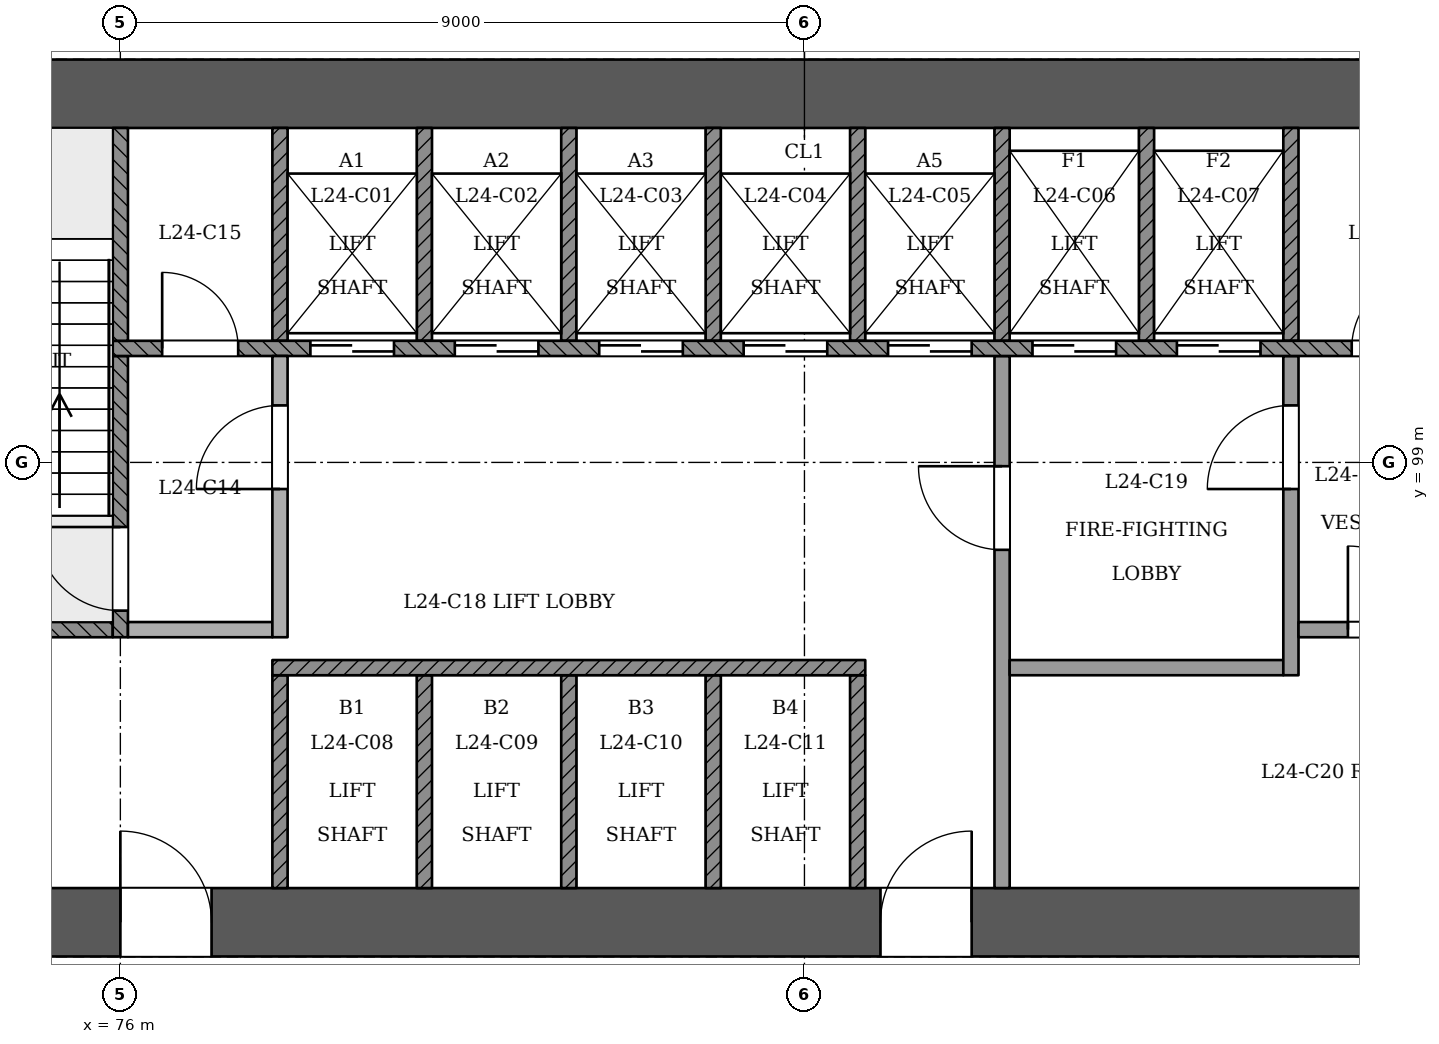
"""IFC4 building model, lengths in metres.
Left out: names, types, materials, properties, quantities, classifications, styles, units other than length and angle.
Written with IfcOpenShell. Run it as: python <this file> out.ifc"""

import sys

from ifc_helpers import new_model, si_unit, direction, frame, frame_2d, origin, place, context, subcontext, project, spatial, rectangle, extrude, element, fill, save


model = new_model("IFC4")
c1 = context("Model", 3, precision=1e-05, world=origin(), true_north=direction((0.0, 1.0)))
c2 = subcontext(c1, "Body", "Model", "MODEL_VIEW")
j1 = project(units=[si_unit("LENGTHUNIT", "METRE"), si_unit("PLANEANGLEUNIT", "RADIAN")], contexts=[c1])
p1 = place(None, origin())
s1 = spatial("IfcSite", under=j1, at=p1, CompositionType="ELEMENT")
p2 = place(p1, origin())
s2 = spatial("IfcBuilding", under=s1, at=p2, CompositionType="ELEMENT")
p3 = place(p2, frame((0.0, 0.0, 95.4)))
s3 = spatial("IfcBuildingStorey", under=s2, at=p3, CompositionType="ELEMENT", Elevation=95.4)
p4 = place(p3, frame((72.55, 92.95, 0.0), z_axis=(0.0, 0.0, 1.0), x_axis=(1.0, 0.0, 0.0)))
e1 = element("IfcWall", 1, at=p4, inside=s3, PredefinedType="SHEAR", context=c2, shape_type="SweptSolid", body=[
    extrude(rectangle(XDim=25.35, YDim=0.9, at=frame_2d((12.675, 0.0))), origin(), (0.0, 0.0, 1.0), 5.4),
])
p5 = place(p4, frame((1.25, 0.0, 0.0)))
e2 = element("IfcOpeningElement", 2, at=p5, cuts=e1, PredefinedType="OPENING", context=c2, shape_type="SweptSolid", body=[
    extrude(rectangle(XDim=1.2, YDim=2.1, at=frame_2d((0.6, 1.05))), frame((0.0, 0.46, 0.0), z_axis=(0.0, -1.0, 0.0), x_axis=(1.0, 0.0, 0.0)), (0.0, 0.0, 1.0), 0.921),
])
p6 = place(p4, frame((3.45, 0.0, 0.0)))
e3 = element("IfcOpeningElement", 3, at=p6, cuts=e1, PredefinedType="OPENING", context=c2, shape_type="SweptSolid", body=[
    extrude(rectangle(XDim=1.2, YDim=2.1, at=frame_2d((0.6, 1.05))), frame((0.0, 0.46, 0.0), z_axis=(0.0, -1.0, 0.0), x_axis=(1.0, 0.0, 0.0)), (0.0, 0.0, 1.0), 0.921),
])
p7 = place(p4, frame((13.45, 0.0, 0.0)))
e4 = element("IfcOpeningElement", 4, at=p7, cuts=e1, PredefinedType="OPENING", context=c2, shape_type="SweptSolid", body=[
    extrude(rectangle(XDim=1.2, YDim=2.1, at=frame_2d((0.6, 1.05))), frame((0.0, 0.46, 0.0), z_axis=(0.0, -1.0, 0.0), x_axis=(1.0, 0.0, 0.0)), (0.0, 0.0, 1.0), 0.921),
])
p8 = place(p4, frame((21.75, 0.0, 0.0)))
e5 = element("IfcOpeningElement", 5, at=p8, cuts=e1, PredefinedType="OPENING", context=c2, shape_type="SweptSolid", body=[
    extrude(rectangle(XDim=1.2, YDim=2.1, at=frame_2d((0.6, 1.05))), frame((0.0, 0.46, 0.0), z_axis=(0.0, -1.0, 0.0), x_axis=(1.0, 0.0, 0.0)), (0.0, 0.0, 1.0), 0.921),
])
p9 = place(p3, frame((97.45, 103.85, 0.0), z_axis=(0.0, 0.0, 1.0), x_axis=(-1.0, 0.0, 0.0)))
e6 = element("IfcWall", 6, at=p9, inside=s3, PredefinedType="SHEAR", context=c2, shape_type="SweptSolid", body=[
    extrude(rectangle(XDim=25.35, YDim=0.9, at=frame_2d((12.675, 0.0))), origin(), (0.0, 0.0, 1.0), 5.4),
])
p10 = place(p3, frame((85.516, 61.158, 0.0), z_axis=(0.0, 0.0, 1.0), x_axis=(0.499997295205, 0.866026965393, 0.0)))
e7 = element("IfcWall", 7, at=p10, inside=s3, PredefinedType="PARTITIONING", context=c2, shape_type="SweptSolid", body=[
    extrude(rectangle(XDim=42.086, YDim=0.2, at=frame_2d((21.043, 0.0))), origin(), (0.0, 0.0, 1.0), 4.5),
])
p11 = place(p10, frame((0.2, 0.0, 0.0)))
e8 = element("IfcOpeningElement", 8, at=p11, cuts=e7, PredefinedType="OPENING", context=c2, shape_type="SweptSolid", body=[
    extrude(rectangle(XDim=1.2, YDim=2.4, at=frame_2d((0.6, 1.2))), frame((0.0, 0.11, 0.0), z_axis=(0.0, -1.0, 0.0), x_axis=(1.0, 0.0, 0.0)), (0.0, 0.0, 1.0), 0.221),
])
p12 = place(p10, frame((9.193, 0.0, 0.0)))
e9 = element("IfcOpeningElement", 9, at=p12, cuts=e7, PredefinedType="OPENING", context=c2, shape_type="SweptSolid", body=[
    extrude(rectangle(XDim=1.2, YDim=2.4, at=frame_2d((0.6, 1.2))), frame((0.0, 0.11, 0.0), z_axis=(0.0, -1.0, 0.0), x_axis=(1.0, 0.0, 0.0)), (0.0, 0.0, 1.0), 0.221),
])
p13 = place(p10, frame((20.443, 0.0, 0.0)))
e10 = element("IfcOpeningElement", 10, at=p13, cuts=e7, PredefinedType="OPENING", context=c2, shape_type="SweptSolid", body=[
    extrude(rectangle(XDim=1.2, YDim=2.4, at=frame_2d((0.6, 1.2))), frame((0.0, 0.11, 0.0), z_axis=(0.0, -1.0, 0.0), x_axis=(1.0, 0.0, 0.0)), (0.0, 0.0, 1.0), 0.221),
])
p14 = place(p10, frame((29.443, 0.0, 0.0)))
e11 = element("IfcOpeningElement", 11, at=p14, cuts=e7, PredefinedType="OPENING", context=c2, shape_type="SweptSolid", body=[
    extrude(rectangle(XDim=1.2, YDim=2.4, at=frame_2d((0.6, 1.2))), frame((0.0, 0.11, 0.0), z_axis=(0.0, -1.0, 0.0), x_axis=(1.0, 0.0, 0.0)), (0.0, 0.0, 1.0), 0.221),
])
p15 = place(p10, frame((40.184, 0.0, 0.0)))
e12 = element("IfcOpeningElement", 12, at=p15, cuts=e7, PredefinedType="OPENING", context=c2, shape_type="SweptSolid", body=[
    extrude(rectangle(XDim=1.2, YDim=2.4, at=frame_2d((0.6, 1.2))), frame((0.0, 0.11, 0.0), z_axis=(0.0, -1.0, 0.0), x_axis=(1.0, 0.0, 0.0)), (0.0, 0.0, 1.0), 0.221),
])
for number, where, z_axis, x_axis in (
    (13, (78.1, 93.4, 0.0), (0.0, 0.0, 1.0), (0.0, 1.0, 0.0)),
    (14, (80.0, 93.4, 0.0), (0.0, 0.0, 1.0), (0.0, 1.0, 0.0)),
    (15, (81.9, 93.4, 0.0), (0.0, 0.0, 1.0), (0.0, 1.0, 0.0)),
    (16, (83.8, 93.4, 0.0), (0.0, 0.0, 1.0), (0.0, 1.0, 0.0)),
    (17, (85.7, 93.4, 0.0), (0.0, 0.0, 1.0), (0.0, 1.0, 0.0)),
):
    element("IfcWall", number, at=place(p3, frame(where, z_axis=z_axis, x_axis=x_axis)), inside=s3, PredefinedType="SOLIDWALL", context=c2, shape_type="SweptSolid", body=[
        extrude(rectangle(XDim=2.8, YDim=0.2, at=frame_2d((1.4, 0.0))), origin(), (0.0, 0.0, 1.0), 4.9),
    ])
p16 = place(p3, frame((87.6, 93.4, 0.0), z_axis=(0.0, 0.0, 1.0), x_axis=(0.0, 1.0, 0.0)))
e18 = element("IfcWall", 18, at=p16, inside=s3, PredefinedType="PARTITIONING", context=c2, shape_type="SweptSolid", body=[
    extrude(rectangle(XDim=7.0, YDim=0.2, at=frame_2d((3.5, 0.0))), origin(), (0.0, 0.0, 1.0), 4.9),
])
p17 = place(p16, frame((4.45, 0.0, 0.0)))
e19 = element("IfcOpeningElement", 19, at=p17, cuts=e18, PredefinedType="OPENING", context=c2, shape_type="SweptSolid", body=[
    extrude(rectangle(XDim=1.1, YDim=2.1, at=frame_2d((0.55, 1.05))), frame((0.0, 0.11, 0.0), z_axis=(0.0, -1.0, 0.0), x_axis=(1.0, 0.0, 0.0)), (0.0, 0.0, 1.0), 0.221),
])
p18 = place(p3, frame((78.0, 96.3, 0.0), z_axis=(0.0, 0.0, 1.0), x_axis=(1.0, 0.0, 0.0)))
e20 = element("IfcWall", 20, at=p18, inside=s3, PredefinedType="SOLIDWALL", context=c2, shape_type="SweptSolid", body=[
    extrude(rectangle(XDim=7.8, YDim=0.2, at=frame_2d((3.9, 0.0))), origin(), (0.0, 0.0, 1.0), 4.9),
])
p19 = place(p3, frame((87.7, 96.3, 0.0), z_axis=(0.0, 0.0, 1.0), x_axis=(1.0, 0.0, 0.0)))
e21 = element("IfcWall", 21, at=p19, inside=s3, PredefinedType="PARTITIONING", context=c2, shape_type="SweptSolid", body=[
    extrude(rectangle(XDim=3.6, YDim=0.2, at=frame_2d((1.8, 0.0))), origin(), (0.0, 0.0, 1.0), 4.9),
])
p20 = place(p3, frame((91.4, 96.2, 0.0), z_axis=(0.0, 0.0, 1.0), x_axis=(0.0, 1.0, 0.0)))
e22 = element("IfcWall", 22, at=p20, inside=s3, PredefinedType="PARTITIONING", context=c2, shape_type="SweptSolid", body=[
    extrude(rectangle(XDim=4.2, YDim=0.2, at=frame_2d((2.1, 0.0))), origin(), (0.0, 0.0, 1.0), 4.9),
])
p21 = place(p20, frame((2.45, 0.0, 0.0)))
e23 = element("IfcOpeningElement", 23, at=p21, cuts=e22, PredefinedType="OPENING", context=c2, shape_type="SweptSolid", body=[
    extrude(rectangle(XDim=1.1, YDim=2.1, at=frame_2d((0.55, 1.05))), frame((0.0, 0.11, 0.0), z_axis=(0.0, -1.0, 0.0), x_axis=(1.0, 0.0, 0.0)), (0.0, 0.0, 1.0), 0.221),
])
p22 = place(p3, frame((73.0, 96.8, 0.0), z_axis=(0.0, 0.0, 1.0), x_axis=(1.0, 0.0, 0.0)))
e24 = element("IfcWall", 24, at=p22, inside=s3, PredefinedType="SOLIDWALL", context=c2, shape_type="SweptSolid", body=[
    extrude(rectangle(XDim=2.9, YDim=0.2, at=frame_2d((1.45, 0.0))), origin(), (0.0, 0.0, 1.0), 4.9),
])
p23 = place(p3, frame((76.0, 96.7, 0.0), z_axis=(0.0, 0.0, 1.0), x_axis=(0.0, 1.0, 0.0)))
e25 = element("IfcWall", 25, at=p23, inside=s3, PredefinedType="SOLIDWALL", context=c2, shape_type="SweptSolid", body=[
    extrude(rectangle(XDim=3.7, YDim=0.2, at=frame_2d((1.85, 0.0))), origin(), (0.0, 0.0, 1.0), 4.9),
])
p24 = place(p23, frame((0.35, 0.0, 0.0)))
e26 = element("IfcOpeningElement", 26, at=p24, cuts=e25, PredefinedType="OPENING", context=c2, shape_type="SweptSolid", body=[
    extrude(rectangle(XDim=1.1, YDim=2.1, at=frame_2d((0.55, 1.05))), frame((0.0, 0.11, 0.0), z_axis=(0.0, -1.0, 0.0), x_axis=(1.0, 0.0, 0.0)), (0.0, 0.0, 1.0), 0.221),
])
p25 = place(p3, frame((76.1, 96.8, 0.0), z_axis=(0.0, 0.0, 1.0), x_axis=(1.0, 0.0, 0.0)))
e27 = element("IfcWall", 27, at=p25, inside=s3, PredefinedType="PARTITIONING", context=c2, shape_type="SweptSolid", body=[
    extrude(rectangle(XDim=1.9, YDim=0.2, at=frame_2d((0.95, 0.0))), origin(), (0.0, 0.0, 1.0), 4.9),
])
p26 = place(p3, frame((78.1, 96.7, 0.0), z_axis=(0.0, 0.0, 1.0), x_axis=(0.0, 1.0, 0.0)))
e28 = element("IfcWall", 28, at=p26, inside=s3, PredefinedType="PARTITIONING", context=c2, shape_type="SweptSolid", body=[
    extrude(rectangle(XDim=3.7, YDim=0.2, at=frame_2d((1.85, 0.0))), origin(), (0.0, 0.0, 1.0), 4.9),
])
p27 = place(p26, frame((1.95, 0.0, 0.0)))
e29 = element("IfcOpeningElement", 29, at=p27, cuts=e28, PredefinedType="OPENING", context=c2, shape_type="SweptSolid", body=[
    extrude(rectangle(XDim=1.1, YDim=2.1, at=frame_2d((0.55, 1.05))), frame((0.0, 0.11, 0.0), z_axis=(0.0, -1.0, 0.0), x_axis=(1.0, 0.0, 0.0)), (0.0, 0.0, 1.0), 0.221),
])
p28 = place(p3, frame((91.5, 96.8, 0.0), z_axis=(0.0, 0.0, 1.0), x_axis=(1.0, 0.0, 0.0)))
e30 = element("IfcWall", 30, at=p28, inside=s3, PredefinedType="PARTITIONING", context=c2, shape_type="SweptSolid", body=[
    extrude(rectangle(XDim=2.4, YDim=0.2, at=frame_2d((1.2, 0.0))), origin(), (0.0, 0.0, 1.0), 4.9),
])
p29 = place(p28, frame((0.65, 0.0, 0.0)))
e31 = element("IfcOpeningElement", 31, at=p29, cuts=e30, PredefinedType="OPENING", context=c2, shape_type="SweptSolid", body=[
    extrude(rectangle(XDim=1.1, YDim=2.1, at=frame_2d((0.55, 1.05))), frame((0.0, 0.11, 0.0), z_axis=(0.0, -1.0, 0.0), x_axis=(1.0, 0.0, 0.0)), (0.0, 0.0, 1.0), 0.221),
])
p30 = place(p3, frame((75.9, 100.5, 0.0), z_axis=(0.0, 0.0, 1.0), x_axis=(1.0, 0.0, 0.0)))
e32 = element("IfcWall", 32, at=p30, inside=s3, PredefinedType="SOLIDWALL", context=c2, shape_type="SweptSolid", body=[
    extrude(rectangle(XDim=18.2, YDim=0.2, at=frame_2d((9.1, 0.0))), origin(), (0.0, 0.0, 1.0), 4.9),
])
p31 = place(p30, frame((2.6, 0.0, 0.0)))
e33 = element("IfcOpeningElement", 33, at=p31, cuts=e32, PredefinedType="OPENING", context=c2, shape_type="SweptSolid", body=[
    extrude(rectangle(XDim=1.1, YDim=2.1, at=frame_2d((0.55, 1.05))), frame((0.0, 0.11, 0.0), z_axis=(0.0, -1.0, 0.0), x_axis=(1.0, 0.0, 0.0)), (0.0, 0.0, 1.0), 0.221),
])
p32 = place(p30, frame((4.5, 0.0, 0.0)))
e34 = element("IfcOpeningElement", 34, at=p32, cuts=e32, PredefinedType="OPENING", context=c2, shape_type="SweptSolid", body=[
    extrude(rectangle(XDim=1.1, YDim=2.1, at=frame_2d((0.55, 1.05))), frame((0.0, 0.11, 0.0), z_axis=(0.0, -1.0, 0.0), x_axis=(1.0, 0.0, 0.0)), (0.0, 0.0, 1.0), 0.221),
])
p33 = place(p30, frame((6.4, 0.0, 0.0)))
e35 = element("IfcOpeningElement", 35, at=p33, cuts=e32, PredefinedType="OPENING", context=c2, shape_type="SweptSolid", body=[
    extrude(rectangle(XDim=1.1, YDim=2.1, at=frame_2d((0.55, 1.05))), frame((0.0, 0.11, 0.0), z_axis=(0.0, -1.0, 0.0), x_axis=(1.0, 0.0, 0.0)), (0.0, 0.0, 1.0), 0.221),
])
p34 = place(p30, frame((8.3, 0.0, 0.0)))
e36 = element("IfcOpeningElement", 36, at=p34, cuts=e32, PredefinedType="OPENING", context=c2, shape_type="SweptSolid", body=[
    extrude(rectangle(XDim=1.1, YDim=2.1, at=frame_2d((0.55, 1.05))), frame((0.0, 0.11, 0.0), z_axis=(0.0, -1.0, 0.0), x_axis=(1.0, 0.0, 0.0)), (0.0, 0.0, 1.0), 0.221),
])
p35 = place(p30, frame((10.2, 0.0, 0.0)))
e37 = element("IfcOpeningElement", 37, at=p35, cuts=e32, PredefinedType="OPENING", context=c2, shape_type="SweptSolid", body=[
    extrude(rectangle(XDim=1.1, YDim=2.1, at=frame_2d((0.55, 1.05))), frame((0.0, 0.11, 0.0), z_axis=(0.0, -1.0, 0.0), x_axis=(1.0, 0.0, 0.0)), (0.0, 0.0, 1.0), 0.221),
])
p36 = place(p30, frame((12.1, 0.0, 0.0)))
e38 = element("IfcOpeningElement", 38, at=p36, cuts=e32, PredefinedType="OPENING", context=c2, shape_type="SweptSolid", body=[
    extrude(rectangle(XDim=1.1, YDim=2.1, at=frame_2d((0.55, 1.05))), frame((0.0, 0.11, 0.0), z_axis=(0.0, -1.0, 0.0), x_axis=(1.0, 0.0, 0.0)), (0.0, 0.0, 1.0), 0.221),
])
p37 = place(p30, frame((14.0, 0.0, 0.0)))
e39 = element("IfcOpeningElement", 39, at=p37, cuts=e32, PredefinedType="OPENING", context=c2, shape_type="SweptSolid", body=[
    extrude(rectangle(XDim=1.1, YDim=2.1, at=frame_2d((0.55, 1.05))), frame((0.0, 0.11, 0.0), z_axis=(0.0, -1.0, 0.0), x_axis=(1.0, 0.0, 0.0)), (0.0, 0.0, 1.0), 0.221),
])
p38 = place(p30, frame((0.65, 0.0, 0.0)))
e40 = element("IfcOpeningElement", 40, at=p38, cuts=e32, PredefinedType="OPENING", context=c2, shape_type="SweptSolid", body=[
    extrude(rectangle(XDim=1.0, YDim=2.1, at=frame_2d((0.5, 1.05))), frame((0.0, 0.11, 0.0), z_axis=(0.0, -1.0, 0.0), x_axis=(1.0, 0.0, 0.0)), (0.0, 0.0, 1.0), 0.221),
])
p39 = place(p30, frame((16.3, 0.0, 0.0)))
e41 = element("IfcOpeningElement", 41, at=p39, cuts=e32, PredefinedType="OPENING", context=c2, shape_type="SweptSolid", body=[
    extrude(rectangle(XDim=1.0, YDim=2.1, at=frame_2d((0.5, 1.05))), frame((0.0, 0.11, 0.0), z_axis=(0.0, -1.0, 0.0), x_axis=(1.0, 0.0, 0.0)), (0.0, 0.0, 1.0), 0.221),
])
for number, where, z_axis, x_axis in (
    (42, (76.0, 100.6, 0.0), (0.0, 0.0, 1.0), (0.0, 1.0, 0.0)),
    (43, (78.1, 100.6, 0.0), (0.0, 0.0, 1.0), (0.0, 1.0, 0.0)),
    (44, (80.0, 100.6, 0.0), (0.0, 0.0, 1.0), (0.0, 1.0, 0.0)),
    (45, (81.9, 100.6, 0.0), (0.0, 0.0, 1.0), (0.0, 1.0, 0.0)),
    (46, (83.8, 100.6, 0.0), (0.0, 0.0, 1.0), (0.0, 1.0, 0.0)),
    (47, (85.7, 100.6, 0.0), (0.0, 0.0, 1.0), (0.0, 1.0, 0.0)),
    (48, (87.6, 100.6, 0.0), (0.0, 0.0, 1.0), (0.0, 1.0, 0.0)),
    (49, (89.5, 100.6, 0.0), (0.0, 0.0, 1.0), (0.0, 1.0, 0.0)),
    (50, (91.4, 100.6, 0.0), (0.0, 0.0, 1.0), (0.0, 1.0, 0.0)),
):
    element("IfcWall", number, at=place(p3, frame(where, z_axis=z_axis, x_axis=x_axis)), inside=s3, PredefinedType="SOLIDWALL", context=c2, shape_type="SweptSolid", body=[
        extrude(rectangle(XDim=2.8, YDim=0.2, at=frame_2d((1.4, 0.0))), origin(), (0.0, 0.0, 1.0), 4.9),
    ])
p40 = place(p31, origin())
e51 = element("IfcDoor", 51, at=p40, inside=s3, OperationType="SLIDING_TO_RIGHT", PredefinedType="NOTDEFINED", context=c2, shape_type="SweptSolid", body=[
    extrude(rectangle(XDim=1.1, YDim=2.1, at=frame_2d((0.55, 1.05))), frame((0.0, 0.025, 0.0), z_axis=(0.0, -1.0, 0.0), x_axis=(1.0, 0.0, 0.0)), (0.0, 0.0, 1.0), 0.05),
])
fill(e33, e51)
p41 = place(p32, origin())
e52 = element("IfcDoor", 52, at=p41, inside=s3, OperationType="SLIDING_TO_LEFT", PredefinedType="NOTDEFINED", context=c2, shape_type="SweptSolid", body=[
    extrude(rectangle(XDim=1.1, YDim=2.1, at=frame_2d((0.55, 1.05))), frame((0.0, 0.025, 0.0), z_axis=(0.0, -1.0, 0.0), x_axis=(1.0, 0.0, 0.0)), (0.0, 0.0, 1.0), 0.05),
])
fill(e34, e52)
p42 = place(p33, origin())
e53 = element("IfcDoor", 53, at=p42, inside=s3, OperationType="SLIDING_TO_RIGHT", PredefinedType="NOTDEFINED", context=c2, shape_type="SweptSolid", body=[
    extrude(rectangle(XDim=1.1, YDim=2.1, at=frame_2d((0.55, 1.05))), frame((0.0, 0.025, 0.0), z_axis=(0.0, -1.0, 0.0), x_axis=(1.0, 0.0, 0.0)), (0.0, 0.0, 1.0), 0.05),
])
fill(e35, e53)
p43 = place(p34, origin())
e54 = element("IfcDoor", 54, at=p43, inside=s3, OperationType="SLIDING_TO_LEFT", PredefinedType="NOTDEFINED", context=c2, shape_type="SweptSolid", body=[
    extrude(rectangle(XDim=1.1, YDim=2.1, at=frame_2d((0.55, 1.05))), frame((0.0, 0.025, 0.0), z_axis=(0.0, -1.0, 0.0), x_axis=(1.0, 0.0, 0.0)), (0.0, 0.0, 1.0), 0.05),
])
fill(e36, e54)
p44 = place(p35, origin())
e55 = element("IfcDoor", 55, at=p44, inside=s3, OperationType="SLIDING_TO_RIGHT", PredefinedType="NOTDEFINED", context=c2, shape_type="SweptSolid", body=[
    extrude(rectangle(XDim=1.1, YDim=2.1, at=frame_2d((0.55, 1.05))), frame((0.0, 0.025, 0.0), z_axis=(0.0, -1.0, 0.0), x_axis=(1.0, 0.0, 0.0)), (0.0, 0.0, 1.0), 0.05),
])
fill(e37, e55)
p45 = place(p36, origin())
e56 = element("IfcDoor", 56, at=p45, inside=s3, OperationType="SLIDING_TO_RIGHT", PredefinedType="NOTDEFINED", context=c2, shape_type="SweptSolid", body=[
    extrude(rectangle(XDim=1.1, YDim=2.1, at=frame_2d((0.55, 1.05))), frame((0.0, 0.025, 0.0), z_axis=(0.0, -1.0, 0.0), x_axis=(1.0, 0.0, 0.0)), (0.0, 0.0, 1.0), 0.05),
])
fill(e38, e56)
p46 = place(p37, origin())
e57 = element("IfcDoor", 57, at=p46, inside=s3, OperationType="SLIDING_TO_LEFT", PredefinedType="NOTDEFINED", context=c2, shape_type="SweptSolid", body=[
    extrude(rectangle(XDim=1.1, YDim=2.1, at=frame_2d((0.55, 1.05))), frame((0.0, 0.025, 0.0), z_axis=(0.0, -1.0, 0.0), x_axis=(1.0, 0.0, 0.0)), (0.0, 0.0, 1.0), 0.05),
])
fill(e39, e57)
p47 = place(p24, origin())
e58 = element("IfcDoor", 58, at=p47, inside=s3, OperationType="SINGLE_SWING_RIGHT", PredefinedType="NOTDEFINED", context=c2, shape_type="SweptSolid", body=[
    extrude(rectangle(XDim=1.1, YDim=2.1, at=frame_2d((0.55, 1.05))), frame((0.0, 0.025, 0.0), z_axis=(0.0, -1.0, 0.0), x_axis=(1.0, 0.0, 0.0)), (0.0, 0.0, 1.0), 0.05),
])
fill(e26, e58)
p48 = place(p27, origin())
e59 = element("IfcDoor", 59, at=p48, inside=s3, OperationType="SINGLE_SWING_LEFT", PredefinedType="NOTDEFINED", context=c2, shape_type="SweptSolid", body=[
    extrude(rectangle(XDim=1.1, YDim=2.1, at=frame_2d((0.55, 1.05))), frame((0.0, 0.025, 0.0), z_axis=(0.0, -1.0, 0.0), x_axis=(1.0, 0.0, 0.0)), (0.0, 0.0, 1.0), 0.05),
])
fill(e29, e59)
p49 = place(p17, origin())
e60 = element("IfcDoor", 60, at=p49, inside=s3, OperationType="SINGLE_SWING_RIGHT", PredefinedType="NOTDEFINED", context=c2, shape_type="SweptSolid", body=[
    extrude(rectangle(XDim=1.1, YDim=2.1, at=frame_2d((0.55, 1.05))), frame((0.0, 0.025, 0.0), z_axis=(0.0, -1.0, 0.0), x_axis=(1.0, 0.0, 0.0)), (0.0, 0.0, 1.0), 0.05),
])
fill(e19, e60)
p50 = place(p21, origin())
e61 = element("IfcDoor", 61, at=p50, inside=s3, OperationType="SINGLE_SWING_LEFT", PredefinedType="NOTDEFINED", context=c2, shape_type="SweptSolid", body=[
    extrude(rectangle(XDim=1.1, YDim=2.1, at=frame_2d((0.55, 1.05))), frame((0.0, 0.025, 0.0), z_axis=(0.0, -1.0, 0.0), x_axis=(1.0, 0.0, 0.0)), (0.0, 0.0, 1.0), 0.05),
])
fill(e23, e61)
p51 = place(p6, origin())
e62 = element("IfcDoor", 62, at=p51, inside=s3, OperationType="SINGLE_SWING_LEFT", PredefinedType="NOTDEFINED", context=c2, shape_type="SweptSolid", body=[
    extrude(rectangle(XDim=1.2, YDim=2.1, at=frame_2d((0.6, 1.05))), frame((0.0, 0.025, 0.0), z_axis=(0.0, -1.0, 0.0), x_axis=(1.0, 0.0, 0.0)), (0.0, 0.0, 1.0), 0.05),
])
fill(e3, e62)
p52 = place(p7, origin())
e63 = element("IfcDoor", 63, at=p52, inside=s3, OperationType="SINGLE_SWING_RIGHT", PredefinedType="NOTDEFINED", context=c2, shape_type="SweptSolid", body=[
    extrude(rectangle(XDim=1.2, YDim=2.1, at=frame_2d((0.6, 1.05))), frame((0.0, 0.025, 0.0), z_axis=(0.0, -1.0, 0.0), x_axis=(1.0, 0.0, 0.0)), (0.0, 0.0, 1.0), 0.05),
])
fill(e4, e63)
p53 = place(p38, origin())
e64 = element("IfcDoor", 64, at=p53, inside=s3, OperationType="SINGLE_SWING_LEFT", PredefinedType="NOTDEFINED", context=c2, shape_type="SweptSolid", body=[
    extrude(rectangle(XDim=1.0, YDim=2.1, at=frame_2d((0.5, 1.05))), frame((0.0, 0.025, 0.0), z_axis=(0.0, -1.0, 0.0), x_axis=(1.0, 0.0, 0.0)), (0.0, 0.0, 1.0), 0.05),
])
fill(e40, e64)
p54 = place(p39, origin())
e65 = element("IfcDoor", 65, at=p54, inside=s3, OperationType="SINGLE_SWING_RIGHT", PredefinedType="NOTDEFINED", context=c2, shape_type="SweptSolid", body=[
    extrude(rectangle(XDim=1.0, YDim=2.1, at=frame_2d((0.5, 1.05))), frame((0.0, 0.025, 0.0), z_axis=(0.0, -1.0, 0.0), x_axis=(1.0, 0.0, 0.0)), (0.0, 0.0, 1.0), 0.05),
])
fill(e41, e65)
p55 = place(p29, origin())
e66 = element("IfcDoor", 66, at=p55, inside=s3, OperationType="SINGLE_SWING_LEFT", PredefinedType="NOTDEFINED", context=c2, shape_type="SweptSolid", body=[
    extrude(rectangle(XDim=1.1, YDim=2.1, at=frame_2d((0.55, 1.05))), frame((0.0, 0.025, 0.0), z_axis=(0.0, -1.0, 0.0), x_axis=(1.0, 0.0, 0.0)), (0.0, 0.0, 1.0), 0.05),
])
fill(e31, e66)
save(model, sys.argv[1])
